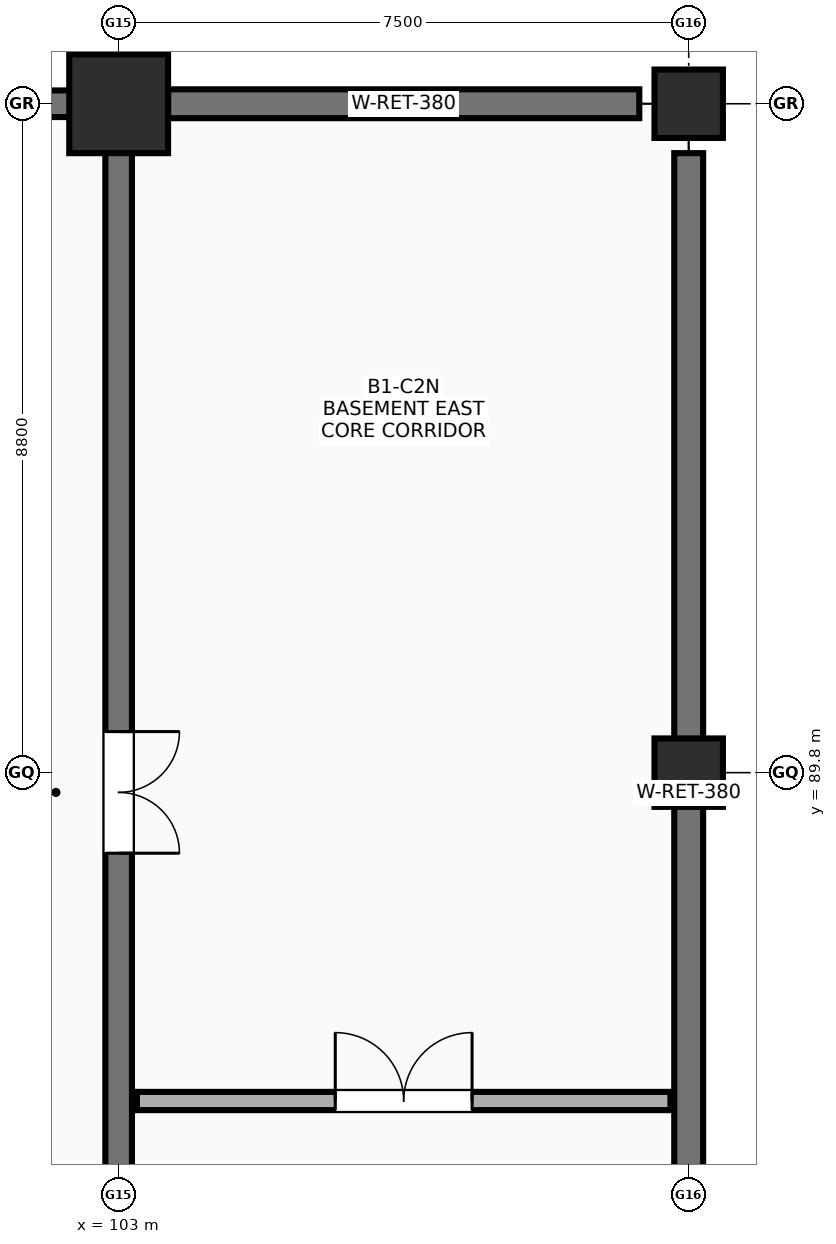
"""IFC4 building model, lengths in metres.
Left out: names, types, materials, properties, quantities, classifications, styles, units other than length and angle.
Written with IfcOpenShell. Run it as: python <this file> out.ifc"""

import sys

from ifc_helpers import new_model, si_unit, direction, frame, frame_2d, origin, origin_2d, place, context, subcontext, project, spatial, rectangle, extrude, element, fill, save


model = new_model("IFC4")
c1 = context("Model", 3, precision=1e-05, world=origin(), true_north=direction((0.0, 1.0)))
c2 = subcontext(c1, "Body", "Model", "MODEL_VIEW")
j1 = project(units=[si_unit("LENGTHUNIT", "METRE"), si_unit("PLANEANGLEUNIT", "RADIAN")], contexts=[c1])
p1 = place(None, origin())
s1 = spatial("IfcSite", under=j1, at=p1, CompositionType="ELEMENT")
p2 = place(p1, origin())
s2 = spatial("IfcBuilding", under=s1, at=p2, CompositionType="ELEMENT")
p3 = place(p2, frame((0.0, 0.0, -4.2)))
s3 = spatial("IfcBuildingStorey", under=s2, at=p3, CompositionType="ELEMENT", Elevation=-4.2)
p4 = place(p3, frame((103.0, 98.6, -0.42), z_axis=(0.0, 0.0, 1.0), x_axis=(1.0, 0.0, 0.0)))
e1 = element("IfcColumn", 1, at=p4, inside=s3, PredefinedType="COLUMN", context=c2, shape_type="SweptSolid", body=[
    extrude(rectangle(XDim=1.3, YDim=1.3, at=origin_2d()), origin(), (0.0, 0.0, 1.0), 4.62),
])
for number, where, z_axis, x_axis in (
    (2, (110.5, 89.8, -0.42), (0.0, 0.0, 1.0), (1.0, 0.0, 0.0)),
    (3, (110.5, 98.6, -0.42), (0.0, 0.0, 1.0), (1.0, 0.0, 0.0)),
):
    element("IfcColumn", number, at=place(p3, frame(where, z_axis=z_axis, x_axis=x_axis)), inside=s3, PredefinedType="COLUMN", context=c2, shape_type="SweptSolid", body=[
        extrude(rectangle(XDim=0.9, YDim=0.9, at=origin_2d()), origin(), (0.0, 0.0, 1.0), 4.62),
    ])
p5 = place(p3, frame((103.0, 73.24, -0.42), z_axis=(0.0, 0.0, 1.0), x_axis=(0.0, 1.0, 0.0)))
e4 = element("IfcWall", 4, at=p5, inside=s3, PredefinedType="SHEAR", context=c2, shape_type="SweptSolid", body=[
    extrude(rectangle(XDim=24.72, YDim=0.35, at=frame_2d((12.36, 0.0))), origin(), (0.0, 0.0, 1.0), 4.62),
])
p6 = place(p5, frame((17.1, 0.0, 0.42), z_axis=(0.0, 0.0, 1.0), x_axis=(-1.0, 0.0, 0.0)))
e5 = element("IfcOpeningElement", 5, at=p6, cuts=e4, PredefinedType="OPENING", context=c2, shape_type="SweptSolid", body=[
    extrude(rectangle(XDim=1.6, YDim=2.18, at=frame_2d((0.8, 1.09))), frame((0.0, 0.185, 0.0), z_axis=(0.0, -1.0, 0.0), x_axis=(1.0, 0.0, 0.0)), (0.0, 0.0, 1.0), 0.37),
])
p7 = place(p3, frame((73.64, 98.6, -0.42), z_axis=(0.0, 0.0, 1.0), x_axis=(1.0, 0.0, 0.0)))
e6 = element("IfcWall", 6, at=p7, inside=s3, PredefinedType="SHEAR", context=c2, shape_type="SweptSolid", body=[
    extrude(rectangle(XDim=28.72, YDim=0.35, at=frame_2d((14.36, 0.0))), origin(), (0.0, 0.0, 1.0), 4.62),
])
p8 = place(p3, frame((103.65, 98.6, -0.42), z_axis=(0.0, 0.0, 1.0), x_axis=(1.0, 0.0, 0.0)))
e7 = element("IfcWall", 7, at=p8, inside=s3, PredefinedType="SHEAR", context=c2, shape_type="SweptSolid", body=[
    extrude(rectangle(XDim=6.2, YDim=0.38, at=frame_2d((3.1, 0.0))), origin(), (0.0, 0.0, 1.0), 4.3),
])
p9 = place(p3, frame((103.24, 85.48, 0.0), z_axis=(0.0, 0.0, 1.0), x_axis=(1.0, 0.0, 0.0)))
e8 = element("IfcWall", 8, at=p9, inside=s3, PredefinedType="SOLIDWALL", context=c2, shape_type="SweptSolid", body=[
    extrude(rectangle(XDim=7.02, YDim=0.24, at=frame_2d((3.51, 0.0))), origin(), (0.0, 0.0, 1.0), 2.96),
])
p10 = place(p9, frame((2.61, 0.0, 0.0)))
e9 = element("IfcOpeningElement", 9, at=p10, cuts=e8, PredefinedType="OPENING", context=c2, shape_type="SweptSolid", body=[
    extrude(rectangle(XDim=1.8, YDim=2.18, at=frame_2d((0.9, 1.09))), frame((0.0, 0.13, 0.0), z_axis=(0.0, -1.0, 0.0), x_axis=(1.0, 0.0, 0.0)), (0.0, 0.0, 1.0), 0.26),
])
p11 = place(p3, frame((110.5, 81.12, -0.42), z_axis=(0.0, 0.0, 1.0), x_axis=(0.0, 1.0, 0.0)))
e10 = element("IfcWall", 10, at=p11, inside=s3, PredefinedType="SHEAR", context=c2, shape_type="SweptSolid", body=[
    extrude(rectangle(XDim=16.83, YDim=0.38, at=frame_2d((8.415, 0.0))), origin(), (0.0, 0.0, 1.0), 4.3),
])
p12 = place(p6, origin())
e11 = element("IfcDoor", 11, at=p12, inside=s3, OperationType="DOUBLE_DOOR_SINGLE_SWING", PredefinedType="DOOR", context=c2, shape_type="SweptSolid", body=[
    extrude(rectangle(XDim=1.6, YDim=2.18, at=frame_2d((0.8, 1.09))), frame((0.0, 0.025, 0.0), z_axis=(0.0, -1.0, 0.0), x_axis=(1.0, 0.0, 0.0)), (0.0, 0.0, 1.0), 0.05),
])
fill(e5, e11)
p13 = place(p10, origin())
e12 = element("IfcDoor", 12, at=p13, inside=s3, OperationType="DOUBLE_DOOR_SINGLE_SWING", PredefinedType="DOOR", context=c2, shape_type="SweptSolid", body=[
    extrude(rectangle(XDim=1.8, YDim=2.18, at=frame_2d((0.9, 1.09))), frame((0.0, 0.025, 0.0), z_axis=(0.0, -1.0, 0.0), x_axis=(1.0, 0.0, 0.0)), (0.0, 0.0, 1.0), 0.05),
])
fill(e9, e12)
save(model, sys.argv[1])
